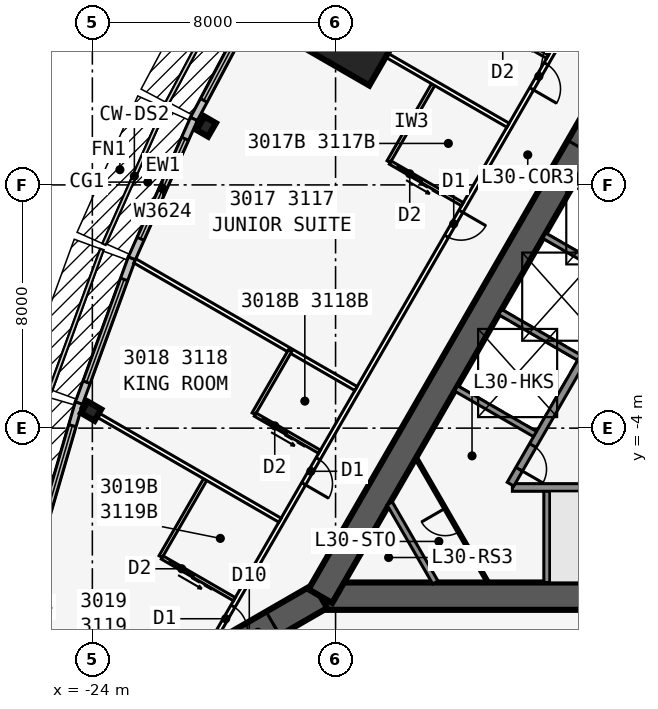
"""IFC4 building model, lengths in metres.
Left out: names, types, materials, properties, quantities, classifications, styles, units other than length and angle.
Written with IfcOpenShell. Run it as: python <this file> out.ifc"""

import sys

from ifc_helpers import new_model, si_unit, direction, frame, frame_2d, origin, origin_2d, place, context, subcontext, project, spatial, rectangle, i_section, extrude, element, fill, save


model = new_model("IFC4")
c1 = context("Model", 3, precision=1e-05, world=origin(), true_north=direction((0.0, 1.0)))
c2 = subcontext(c1, "Body", "Model", "MODEL_VIEW")
j1 = project(units=[si_unit("LENGTHUNIT", "METRE"), si_unit("PLANEANGLEUNIT", "RADIAN")], contexts=[c1])
p1 = place(None, origin())
s1 = spatial("IfcSite", under=j1, at=p1, CompositionType="ELEMENT")
p2 = place(p1, origin())
s2 = spatial("IfcBuilding", under=s1, at=p2, CompositionType="ELEMENT")
p3 = place(p2, frame((0.0, 0.0, 118.1)))
s3 = spatial("IfcBuildingStorey", under=s2, at=p3, CompositionType="ELEMENT", Elevation=118.1)
p4 = place(p3, frame((-16.5, -9.526, 0.0), z_axis=(0.0, 0.0, 1.0), x_axis=(1.0, 0.0, 0.0)))
e1 = element("IfcWall", 1, at=p4, inside=s3, PredefinedType="SHEAR", context=c2, shape_type="SweptSolid", body=[
    extrude(rectangle(XDim=33.0, YDim=0.9, at=frame_2d((16.5, 0.0))), origin(), (0.0, 0.0, 1.0), 3.4),
])
p5 = place(p4, frame((14.05, 0.0, 0.0)))
e2 = element("IfcOpeningElement", 2, at=p5, cuts=e1, PredefinedType="OPENING", context=c2, shape_type="SweptSolid", body=[
    extrude(rectangle(XDim=1.8, YDim=2.13, at=frame_2d((0.9, 1.065))), frame((0.0, 0.46, 0.0), z_axis=(0.0, -1.0, 0.0), x_axis=(1.0, 0.0, 0.0)), (0.0, 0.0, 1.0), 0.92),
])
p6 = place(p3, frame((-10.183, -5.951, 0.0), z_axis=(0.0, 0.0, 1.0), x_axis=(1.0, 0.0, 0.0)))
e3 = element("IfcWall", 3, at=p6, inside=s3, PredefinedType="SOLIDWALL", context=c2, shape_type="SweptSolid", body=[
    extrude(rectangle(XDim=7.633, YDim=0.25, at=frame_2d((3.816, 0.0))), origin(), (0.0, 0.0, 1.0), 3.235),
])
p7 = place(p3, frame((-9.05, -5.951, 0.0), z_axis=(0.0, 0.0, 1.0), x_axis=(0.0, -1.0, 0.0)))
e4 = element("IfcWall", 4, at=p7, inside=s3, PredefinedType="SOLIDWALL", context=c2, shape_type="SweptSolid", body=[
    extrude(rectangle(XDim=3.125, YDim=0.2, at=frame_2d((1.562, 0.0))), origin(), (0.0, 0.0, 1.0), 3.235),
])
p8 = place(p3, frame((0.0, 19.052, 0.0), z_axis=(0.0, 0.0, 1.0), x_axis=(-0.499999749417, -0.866025548458, 0.0)))
e5 = element("IfcWall", 5, at=p8, inside=s3, PredefinedType="SHEAR", context=c2, shape_type="SweptSolid", body=[
    extrude(rectangle(XDim=33.0, YDim=0.9, at=frame_2d((16.5, 0.0))), origin(), (0.0, 0.0, 1.0), 3.4),
])
p9 = place(p8, frame((14.15, 0.0, 0.0)))
e6 = element("IfcOpeningElement", 6, at=p9, cuts=e5, PredefinedType="OPENING", context=c2, shape_type="SweptSolid", body=[
    extrude(rectangle(XDim=1.8, YDim=2.13, at=frame_2d((0.9, 1.065))), frame((0.0, 0.46, 0.0), z_axis=(0.0, -1.0, 0.0), x_axis=(1.0, 0.0, 0.0)), (0.0, 0.0, 1.0), 0.92),
])
p10 = place(p8, frame((12.6, 0.0, 0.0)))
e7 = element("IfcOpeningElement", 7, at=p10, cuts=e5, PredefinedType="OPENING", context=c2, shape_type="SweptSolid", body=[
    extrude(rectangle(XDim=1.0, YDim=2.13, at=frame_2d((0.5, 1.065))), frame((0.0, 0.46, 0.0), z_axis=(0.0, -1.0, 0.0), x_axis=(1.0, 0.0, 0.0)), (0.0, 0.0, 1.0), 0.92),
])
p11 = place(p3, frame((-4.929, 3.365, 0.0), z_axis=(0.0, 0.0, 1.0), x_axis=(-0.499991433582, -0.866030349552, 0.0)))
e8 = element("IfcWall", 8, at=p11, inside=s3, PredefinedType="SOLIDWALL", context=c2, shape_type="SweptSolid", body=[
    extrude(rectangle(XDim=10.633, YDim=0.25, at=frame_2d((5.316, 0.0))), origin(), (0.0, 0.0, 1.0), 3.235),
])
p12 = place(p11, frame((9.164, 0.0, 0.0)))
e9 = element("IfcOpeningElement", 9, at=p12, cuts=e8, PredefinedType="OPENING", context=c2, shape_type="SweptSolid", body=[
    extrude(rectangle(XDim=0.9, YDim=2.13, at=frame_2d((0.45, 1.065))), frame((0.0, 0.135, 0.0), z_axis=(0.0, -1.0, 0.0), x_axis=(1.0, 0.0, 0.0)), (0.0, 0.0, 1.0), 0.27),
])
for number, where, z_axis, x_axis in (
    (10, (-6.429, 0.767, 0.0), (0.0, 0.0, 1.0), (-0.866, 0.5, 0.0)),
    (11, (-7.879, -1.744, 0.0), (0.0, 0.0, 1.0), (-0.866, 0.5, 0.0)),
    (12, (-9.329, -4.256, 0.0), (0.0, 0.0, 1.0), (-0.866, 0.5, 0.0)),
):
    element("IfcWall", number, at=place(p3, frame(where, z_axis=z_axis, x_axis=x_axis)), inside=s3, PredefinedType="SOLIDWALL", context=c2, shape_type="SweptSolid", body=[
        extrude(rectangle(XDim=3.125, YDim=0.2, at=frame_2d((1.562, 0.0))), origin(), (0.0, 0.0, 1.0), 3.235),
    ])
p13 = place(p3, frame((-16.5, -9.526, 0.0), z_axis=(0.0, 0.0, 1.0), x_axis=(-0.866031398331, -0.499989616998, 0.0)))
e13 = element("IfcWall", 13, at=p13, inside=s3, PredefinedType="SHEAR", context=c2, shape_type="SweptSolid", body=[
    extrude(rectangle(XDim=4.746, YDim=0.9, at=frame_2d((2.373, 0.0))), origin(), (0.0, 0.0, 1.0), 3.4),
])
p14 = place(p13, frame((1.8, 0.0, 0.0)))
e14 = element("IfcOpeningElement", 14, at=p14, cuts=e13, PredefinedType="OPENING", context=c2, shape_type="SweptSolid", body=[
    extrude(rectangle(XDim=1.8, YDim=2.13, at=frame_2d((0.9, 1.065))), frame((0.0, 0.46, 0.0), z_axis=(0.0, -1.0, 0.0), x_axis=(1.0, 0.0, 0.0)), (0.0, 0.0, 1.0), 0.92),
])
for number, where, z_axis, x_axis in (
    (15, (-20.254, 5.92, 0.0), (0.0, 0.0, 1.0), (-0.866, 0.5, 0.0)),
    (16, (-24.041, -3.44, 0.0), (0.0, 0.0, 1.0), (-0.5, -0.866, 0.0)),
):
    element("IfcColumn", number, at=place(p3, frame(where, z_axis=z_axis, x_axis=x_axis)), inside=s3, PredefinedType="COLUMN", context=c2, shape_type="SweptSolid", body=[
        extrude(i_section(OverallWidth=0.437, OverallDepth=0.513, WebThickness=0.061, FlangeThickness=0.097, at=origin_2d()), origin(), (0.0, 0.0, 1.0), 3.4),
    ])
p15 = place(p3, frame((-15.312, 8.84, 0.0), z_axis=(0.0, 0.0, 1.0), x_axis=(-0.866025403784, 0.5, 0.0)))
e17 = element("IfcColumn", 17, at=p15, inside=s3, PredefinedType="COLUMN", context=c2, shape_type="SweptSolid", body=[
    extrude(rectangle(XDim=2.3, YDim=2.3, at=origin_2d()), origin(), (0.0, 0.0, 1.0), 3.4),
])
p16 = place(p3, frame((-18.314, 10.579, 0.0), z_axis=(0.0, 0.0, 1.0), x_axis=(-0.469404966864, -0.882982999317, 0.0)))
e18 = element("IfcWall", 18, at=p16, inside=s3, PredefinedType="STANDARD", context=c2, shape_type="SweptSolid", body=[
    extrude(rectangle(XDim=5.003, YDim=0.25, at=frame_2d((2.501, 0.0))), origin(), (0.0, 0.0, 1.0), 3.235),
])
p17 = place(p16, frame((0.701, 0.0, 0.45)))
e19 = element("IfcOpeningElement", 19, at=p17, cuts=e18, PredefinedType="OPENING", context=c2, shape_type="SweptSolid", body=[
    extrude(rectangle(XDim=3.6, YDim=2.4, at=frame_2d((1.8, 1.2))), frame((0.0, 0.135, 0.0), z_axis=(0.0, -1.0, 0.0), x_axis=(1.0, 0.0, 0.0)), (0.0, 0.0, 1.0), 0.27),
])
p18 = place(p3, frame((-20.659, 6.169, 0.0), z_axis=(0.0, 0.0, 1.0), x_axis=(-0.406832200364, -0.913502906808, 0.0)))
e20 = element("IfcWall", 20, at=p18, inside=s3, PredefinedType="STANDARD", context=c2, shape_type="SweptSolid", body=[
    extrude(rectangle(XDim=5.028, YDim=0.25, at=frame_2d((2.514, 0.0))), origin(), (0.0, 0.0, 1.0), 3.235),
])
p19 = place(p18, frame((0.714, 0.0, 0.45)))
e21 = element("IfcOpeningElement", 21, at=p19, cuts=e20, PredefinedType="OPENING", context=c2, shape_type="SweptSolid", body=[
    extrude(rectangle(XDim=3.6, YDim=2.4, at=frame_2d((1.8, 1.2))), frame((0.0, 0.135, 0.0), z_axis=(0.0, -1.0, 0.0), x_axis=(1.0, 0.0, 0.0)), (0.0, 0.0, 1.0), 0.27),
])
p20 = place(p3, frame((-22.701, 1.584, 0.0), z_axis=(0.0, 0.0, 1.0), x_axis=(-0.343225593282, -0.939252996863, 0.0)))
e22 = element("IfcWall", 22, at=p20, inside=s3, PredefinedType="STANDARD", context=c2, shape_type="SweptSolid", body=[
    extrude(rectangle(XDim=5.076, YDim=0.25, at=frame_2d((2.538, 0.0))), origin(), (0.0, 0.0, 1.0), 3.235),
])
p21 = place(p20, frame((0.738, 0.0, 0.45)))
e23 = element("IfcOpeningElement", 23, at=p21, cuts=e22, PredefinedType="OPENING", context=c2, shape_type="SweptSolid", body=[
    extrude(rectangle(XDim=3.6, YDim=2.4, at=frame_2d((1.8, 1.2))), frame((0.0, 0.135, 0.0), z_axis=(0.0, -1.0, 0.0), x_axis=(1.0, 0.0, 0.0)), (0.0, 0.0, 1.0), 0.27),
])
p22 = place(p3, frame((-24.441, -3.175, 0.0), z_axis=(0.0, 0.0, 1.0), x_axis=(-0.279528287117, -0.960137457191, 0.0)))
e24 = element("IfcWall", 24, at=p22, inside=s3, PredefinedType="STANDARD", context=c2, shape_type="SweptSolid", body=[
    extrude(rectangle(XDim=5.148, YDim=0.25, at=frame_2d((2.574, 0.0))), origin(), (0.0, 0.0, 1.0), 3.235),
])
p23 = place(p22, frame((0.774, 0.0, 0.45)))
e25 = element("IfcOpeningElement", 25, at=p23, cuts=e24, PredefinedType="OPENING", context=c2, shape_type="SweptSolid", body=[
    extrude(rectangle(XDim=3.6, YDim=2.4, at=frame_2d((1.8, 1.2))), frame((0.0, 0.135, 0.0), z_axis=(0.0, -1.0, 0.0), x_axis=(1.0, 0.0, 0.0)), (0.0, 0.0, 1.0), 0.27),
])
p24 = place(p3, frame((-0.5, 22.836, 0.0), z_axis=(0.0, 0.0, 1.0), x_axis=(-0.500001677587, -0.866024435227, 0.0)))
e26 = element("IfcWall", 26, at=p24, inside=s3, PredefinedType="PARTITIONING", context=c2, shape_type="SweptSolid", body=[
    extrude(rectangle(XDim=39.054, YDim=0.15, at=frame_2d((19.527, 0.0))), origin(), (0.0, 0.0, 1.0), 3.235),
])
p25 = place(p24, frame((0.352, 0.0, 0.0)))
e27 = element("IfcOpeningElement", 27, at=p25, cuts=e26, PredefinedType="OPENING", context=c2, shape_type="SweptSolid", body=[
    extrude(rectangle(XDim=0.95, YDim=2.13, at=frame_2d((0.475, 1.065))), frame((0.0, 0.085, 0.0), z_axis=(0.0, -1.0, 0.0), x_axis=(1.0, 0.0, 0.0)), (0.0, 0.0, 1.0), 0.17),
])
p26 = place(p24, frame((7.152, 0.0, 0.0)))
e28 = element("IfcOpeningElement", 28, at=p26, cuts=e26, PredefinedType="OPENING", context=c2, shape_type="SweptSolid", body=[
    extrude(rectangle(XDim=0.95, YDim=2.13, at=frame_2d((0.475, 1.065))), frame((0.0, 0.085, 0.0), z_axis=(0.0, -1.0, 0.0), x_axis=(1.0, 0.0, 0.0)), (0.0, 0.0, 1.0), 0.17),
])
p27 = place(p24, frame((12.152, 0.0, 0.0)))
e29 = element("IfcOpeningElement", 29, at=p27, cuts=e26, PredefinedType="OPENING", context=c2, shape_type="SweptSolid", body=[
    extrude(rectangle(XDim=0.95, YDim=2.13, at=frame_2d((0.475, 1.065))), frame((0.0, 0.085, 0.0), z_axis=(0.0, -1.0, 0.0), x_axis=(1.0, 0.0, 0.0)), (0.0, 0.0, 1.0), 0.17),
])
p28 = place(p24, frame((17.152, 0.0, 0.0)))
e30 = element("IfcOpeningElement", 30, at=p28, cuts=e26, PredefinedType="OPENING", context=c2, shape_type="SweptSolid", body=[
    extrude(rectangle(XDim=0.95, YDim=2.13, at=frame_2d((0.475, 1.065))), frame((0.0, 0.085, 0.0), z_axis=(0.0, -1.0, 0.0), x_axis=(1.0, 0.0, 0.0)), (0.0, 0.0, 1.0), 0.17),
])
p29 = place(p24, frame((22.752, 0.0, 0.0)))
e31 = element("IfcOpeningElement", 31, at=p29, cuts=e26, PredefinedType="OPENING", context=c2, shape_type="SweptSolid", body=[
    extrude(rectangle(XDim=0.95, YDim=2.13, at=frame_2d((0.475, 1.065))), frame((0.0, 0.085, 0.0), z_axis=(0.0, -1.0, 0.0), x_axis=(1.0, 0.0, 0.0)), (0.0, 0.0, 1.0), 0.17),
])
p30 = place(p24, frame((32.152, 0.0, 0.0)))
e32 = element("IfcOpeningElement", 32, at=p30, cuts=e26, PredefinedType="OPENING", context=c2, shape_type="SweptSolid", body=[
    extrude(rectangle(XDim=0.95, YDim=2.13, at=frame_2d((0.475, 1.065))), frame((0.0, 0.085, 0.0), z_axis=(0.0, -1.0, 0.0), x_axis=(1.0, 0.0, 0.0)), (0.0, 0.0, 1.0), 0.17),
])
p31 = place(p24, frame((37.752, 0.0, 0.0)))
e33 = element("IfcOpeningElement", 33, at=p31, cuts=e26, PredefinedType="OPENING", context=c2, shape_type="SweptSolid", body=[
    extrude(rectangle(XDim=0.95, YDim=2.13, at=frame_2d((0.475, 1.065))), frame((0.0, 0.085, 0.0), z_axis=(0.0, -1.0, 0.0), x_axis=(1.0, 0.0, 0.0)), (0.0, 0.0, 1.0), 0.17),
])
p32 = place(p3, frame((-10.329, 5.963, 0.0), z_axis=(0.0, 0.0, 1.0), x_axis=(-0.866025170687, 0.500000403736, 0.0)))
e34 = element("IfcWall", 34, at=p32, inside=s3, PredefinedType="PARTITIONING", context=c2, shape_type="SweptSolid", body=[
    extrude(rectangle(XDim=9.099, YDim=0.15, at=frame_2d((4.549, 0.0))), origin(), (0.0, 0.0, 1.0), 2.389),
])
p33 = place(p3, frame((-15.329, -2.697, 0.0), z_axis=(0.0, 0.0, 1.0), x_axis=(-0.866024316602, 0.50000188305, 0.0)))
e35 = element("IfcWall", 35, at=p33, inside=s3, PredefinedType="PARTITIONING", context=c2, shape_type="SweptSolid", body=[
    extrude(rectangle(XDim=8.395, YDim=0.15, at=frame_2d((4.198, 0.0))), origin(), (0.0, 0.0, 1.0), 2.389),
])
p34 = place(p3, frame((-17.829, -7.027, 0.0), z_axis=(0.0, 0.0, 1.0), x_axis=(-0.866029804378, 0.499992377871, 0.0)))
e36 = element("IfcWall", 36, at=p34, inside=s3, PredefinedType="PARTITIONING", context=c2, shape_type="SweptSolid", body=[
    extrude(rectangle(XDim=7.516, YDim=0.15, at=frame_2d((3.758, 0.0))), origin(), (0.0, 0.0, 1.0), 2.389),
])
p35 = place(p3, frame((-9.029, 8.215, 0.0), z_axis=(0.0, 0.0, 1.0), x_axis=(-0.866023955769, 0.500002508028, 0.0)))
e37 = element("IfcWall", 37, at=p35, inside=s3, PredefinedType="PLUMBINGWALL", context=c2, shape_type="SweptSolid", body=[
    extrude(rectangle(XDim=2.44, YDim=0.12, at=frame_2d((1.22, 0.0))), origin(), (0.0, 0.0, 1.0), 3.235),
])
p36 = place(p35, frame((1.25, 0.0, 0.0)))
e38 = element("IfcOpeningElement", 38, at=p36, cuts=e37, PredefinedType="OPENING", context=c2, shape_type="SweptSolid", body=[
    extrude(rectangle(XDim=0.9, YDim=2.13, at=frame_2d((0.45, 1.065))), frame((0.0, 0.07, 0.0), z_axis=(0.0, -1.0, 0.0), x_axis=(1.0, 0.0, 0.0)), (0.0, 0.0, 1.0), 0.14),
])
p37 = place(p3, frame((-12.753, 7.363, 0.0), z_axis=(0.0, 0.0, 1.0), x_axis=(-0.50002537861, -0.866010750942, 0.0)))
e39 = element("IfcWall", 39, at=p37, inside=s3, PredefinedType="PLUMBINGWALL", context=c2, shape_type="SweptSolid", body=[
    extrude(rectangle(XDim=3.0, YDim=0.12, at=frame_2d((1.5, 0.0))), origin(), (0.0, 0.0, 1.0), 3.235),
])
p38 = place(p3, frame((-11.829, 3.365, 0.0), z_axis=(0.0, 0.0, 1.0), x_axis=(-0.865997131366, 0.500048966069, 0.0)))
e40 = element("IfcWall", 40, at=p38, inside=s3, PredefinedType="PLUMBINGWALL", context=c2, shape_type="SweptSolid", body=[
    extrude(rectangle(XDim=2.74, YDim=0.12, at=frame_2d((1.37, 0.0))), origin(), (0.0, 0.0, 1.0), 3.235),
])
p39 = place(p38, frame((1.55, 0.0, 0.0)))
e41 = element("IfcOpeningElement", 41, at=p39, cuts=e40, PredefinedType="OPENING", context=c2, shape_type="SweptSolid", body=[
    extrude(rectangle(XDim=0.9, YDim=2.13, at=frame_2d((0.45, 1.065))), frame((0.0, 0.07, 0.0), z_axis=(0.0, -1.0, 0.0), x_axis=(1.0, 0.0, 0.0)), (0.0, 0.0, 1.0), 0.14),
])
p40 = place(p3, frame((-17.493, -1.447, 0.0), z_axis=(0.0, 0.0, 1.0), x_axis=(-0.500033551112, -0.866006032174, 0.0)))
e42 = element("IfcWall", 42, at=p40, inside=s3, PredefinedType="PLUMBINGWALL", context=c2, shape_type="SweptSolid", body=[
    extrude(rectangle(XDim=2.4, YDim=0.12, at=frame_2d((1.2, 0.0))), origin(), (0.0, 0.0, 1.0), 3.235),
])
p41 = place(p3, frame((-16.529, -4.776, 0.0), z_axis=(0.0, 0.0, 1.0), x_axis=(-0.866023955769, 0.500002508028, 0.0)))
e43 = element("IfcWall", 43, at=p41, inside=s3, PredefinedType="PLUMBINGWALL", context=c2, shape_type="SweptSolid", body=[
    extrude(rectangle(XDim=2.44, YDim=0.12, at=frame_2d((1.22, 0.0))), origin(), (0.0, 0.0, 1.0), 3.235),
])
p42 = place(p41, frame((1.25, 0.0, 0.0)))
e44 = element("IfcOpeningElement", 44, at=p42, cuts=e43, PredefinedType="OPENING", context=c2, shape_type="SweptSolid", body=[
    extrude(rectangle(XDim=0.9, YDim=2.13, at=frame_2d((0.45, 1.065))), frame((0.0, 0.07, 0.0), z_axis=(0.0, -1.0, 0.0), x_axis=(1.0, 0.0, 0.0)), (0.0, 0.0, 1.0), 0.14),
])
p43 = place(p3, frame((-20.253, -5.627, 0.0), z_axis=(0.0, 0.0, 1.0), x_axis=(-0.499990139034, -0.866031096941, 0.0)))
e45 = element("IfcWall", 45, at=p43, inside=s3, PredefinedType="PLUMBINGWALL", context=c2, shape_type="SweptSolid", body=[
    extrude(rectangle(XDim=3.0, YDim=0.12, at=frame_2d((1.5, 0.0))), origin(), (0.0, 0.0, 1.0), 3.235),
])
p44 = place(p3, frame((-19.329, -9.625, 0.0), z_axis=(0.0, 0.0, 1.0), x_axis=(-0.866035715982, 0.499982138324, 0.0)))
e46 = element("IfcWall", 46, at=p44, inside=s3, PredefinedType="PLUMBINGWALL", context=c2, shape_type="SweptSolid", body=[
    extrude(rectangle(XDim=2.74, YDim=0.12, at=frame_2d((1.37, 0.0))), origin(), (0.0, 0.0, 1.0), 3.235),
])
p45 = place(p44, frame((1.55, 0.0, 0.0)))
e47 = element("IfcOpeningElement", 47, at=p45, cuts=e46, PredefinedType="OPENING", context=c2, shape_type="SweptSolid", body=[
    extrude(rectangle(XDim=0.9, YDim=2.13, at=frame_2d((0.45, 1.065))), frame((0.0, 0.07, 0.0), z_axis=(0.0, -1.0, 0.0), x_axis=(1.0, 0.0, 0.0)), (0.0, 0.0, 1.0), 0.14),
])
p46 = place(p3, frame((-12.719, -9.076, 0.0), z_axis=(0.0, 0.0, 1.0), x_axis=(-0.499952404951, 0.866052881055, 0.0)))
e48 = element("IfcWall", 48, at=p46, inside=s3, PredefinedType="SOLIDWALL", context=c2, shape_type="SweptSolid", body=[
    extrude(rectangle(XDim=3.002, YDim=0.2, at=frame_2d((1.501, 0.0))), origin(), (0.0, 0.0, 1.0), 3.235),
])
p47 = place(p3, frame((-10.986, -9.076, 0.0), z_axis=(0.0, 0.0, 1.0), x_axis=(-0.499999210213, 0.866025859768, 0.0)))
e49 = element("IfcWall", 49, at=p47, inside=s3, PredefinedType="PARTITIONING", context=c2, shape_type="SweptSolid", body=[
    extrude(rectangle(XDim=4.734, YDim=0.1, at=frame_2d((2.367, 0.0))), origin(), (0.0, 0.0, 1.0), 3.235),
])
p48 = place(p47, frame((1.917, 0.0, 0.0)))
e50 = element("IfcOpeningElement", 50, at=p48, cuts=e49, PredefinedType="OPENING", context=c2, shape_type="SweptSolid", body=[
    extrude(rectangle(XDim=0.9, YDim=2.13, at=frame_2d((0.45, 1.065))), frame((0.0, 0.06, 0.0), z_axis=(0.0, -1.0, 0.0), x_axis=(1.0, 0.0, 0.0)), (0.0, 0.0, 1.0), 0.12),
])
p49 = place(p17, origin())
e51 = element("IfcWindow", 51, at=p49, inside=s3, PartitioningType="SINGLE_PANEL", PredefinedType="WINDOW", context=c2, shape_type="SweptSolid", body=[
    extrude(rectangle(XDim=3.6, YDim=2.4, at=frame_2d((1.8, 1.2))), frame((0.0, 0.03, 0.0), z_axis=(0.0, -1.0, 0.0), x_axis=(1.0, 0.0, 0.0)), (0.0, 0.0, 1.0), 0.06),
])
fill(e19, e51)
p50 = place(p19, origin())
e52 = element("IfcWindow", 52, at=p50, inside=s3, PartitioningType="SINGLE_PANEL", PredefinedType="WINDOW", context=c2, shape_type="SweptSolid", body=[
    extrude(rectangle(XDim=3.6, YDim=2.4, at=frame_2d((1.8, 1.2))), frame((0.0, 0.03, 0.0), z_axis=(0.0, -1.0, 0.0), x_axis=(1.0, 0.0, 0.0)), (0.0, 0.0, 1.0), 0.06),
])
fill(e21, e52)
p51 = place(p21, origin())
e53 = element("IfcWindow", 53, at=p51, inside=s3, PartitioningType="SINGLE_PANEL", PredefinedType="WINDOW", context=c2, shape_type="SweptSolid", body=[
    extrude(rectangle(XDim=3.6, YDim=2.4, at=frame_2d((1.8, 1.2))), frame((0.0, 0.03, 0.0), z_axis=(0.0, -1.0, 0.0), x_axis=(1.0, 0.0, 0.0)), (0.0, 0.0, 1.0), 0.06),
])
fill(e23, e53)
p52 = place(p23, origin())
e54 = element("IfcWindow", 54, at=p52, inside=s3, PartitioningType="SINGLE_PANEL", PredefinedType="WINDOW", context=c2, shape_type="SweptSolid", body=[
    extrude(rectangle(XDim=3.6, YDim=2.4, at=frame_2d((1.8, 1.2))), frame((0.0, 0.03, 0.0), z_axis=(0.0, -1.0, 0.0), x_axis=(1.0, 0.0, 0.0)), (0.0, 0.0, 1.0), 0.06),
])
fill(e25, e54)
p53 = place(p28, origin())
e55 = element("IfcDoor", 55, at=p53, inside=s3, OperationType="SINGLE_SWING_RIGHT", PredefinedType="DOOR", context=c2, shape_type="SweptSolid", body=[
    extrude(rectangle(XDim=0.95, YDim=2.13, at=frame_2d((0.475, 1.065))), frame((0.0, 0.025, 0.0), z_axis=(0.0, -1.0, 0.0), x_axis=(1.0, 0.0, 0.0)), (0.0, 0.0, 1.0), 0.05),
])
fill(e30, e55)
p54 = place(p39, origin())
e56 = element("IfcDoor", 56, at=p54, inside=s3, OperationType="SLIDING_TO_LEFT", PredefinedType="DOOR", context=c2, shape_type="SweptSolid", body=[
    extrude(rectangle(XDim=0.9, YDim=2.13, at=frame_2d((0.45, 1.065))), frame((0.0, 0.025, 0.0), z_axis=(0.0, -1.0, 0.0), x_axis=(1.0, 0.0, 0.0)), (0.0, 0.0, 1.0), 0.05),
])
fill(e41, e56)
p55 = place(p29, origin())
e57 = element("IfcDoor", 57, at=p55, inside=s3, OperationType="SINGLE_SWING_LEFT", PredefinedType="DOOR", context=c2, shape_type="SweptSolid", body=[
    extrude(rectangle(XDim=0.95, YDim=2.13, at=frame_2d((0.475, 1.065))), frame((0.0, 0.025, 0.0), z_axis=(0.0, -1.0, 0.0), x_axis=(1.0, 0.0, 0.0)), (0.0, 0.0, 1.0), 0.05),
])
fill(e31, e57)
p56 = place(p42, origin())
e58 = element("IfcDoor", 58, at=p56, inside=s3, OperationType="SLIDING_TO_LEFT", PredefinedType="DOOR", context=c2, shape_type="SweptSolid", body=[
    extrude(rectangle(XDim=0.9, YDim=2.13, at=frame_2d((0.45, 1.065))), frame((0.0, 0.025, 0.0), z_axis=(0.0, -1.0, 0.0), x_axis=(1.0, 0.0, 0.0)), (0.0, 0.0, 1.0), 0.05),
])
fill(e44, e58)
p57 = place(p30, origin())
e59 = element("IfcDoor", 59, at=p57, inside=s3, OperationType="SINGLE_SWING_RIGHT", PredefinedType="DOOR", context=c2, shape_type="SweptSolid", body=[
    extrude(rectangle(XDim=0.95, YDim=2.13, at=frame_2d((0.475, 1.065))), frame((0.0, 0.025, 0.0), z_axis=(0.0, -1.0, 0.0), x_axis=(1.0, 0.0, 0.0)), (0.0, 0.0, 1.0), 0.05),
])
fill(e32, e59)
p58 = place(p45, origin())
e60 = element("IfcDoor", 60, at=p58, inside=s3, OperationType="SLIDING_TO_LEFT", PredefinedType="DOOR", context=c2, shape_type="SweptSolid", body=[
    extrude(rectangle(XDim=0.9, YDim=2.13, at=frame_2d((0.45, 1.065))), frame((0.0, 0.025, 0.0), z_axis=(0.0, -1.0, 0.0), x_axis=(1.0, 0.0, 0.0)), (0.0, 0.0, 1.0), 0.05),
])
fill(e47, e60)
p59 = place(p31, origin())
e61 = element("IfcDoor", 61, at=p59, inside=s3, OperationType="SINGLE_SWING_RIGHT", PredefinedType="DOOR", context=c2, shape_type="SweptSolid", body=[
    extrude(rectangle(XDim=0.95, YDim=2.13, at=frame_2d((0.475, 1.065))), frame((0.0, 0.025, 0.0), z_axis=(0.0, -1.0, 0.0), x_axis=(1.0, 0.0, 0.0)), (0.0, 0.0, 1.0), 0.05),
])
fill(e33, e61)
p60 = place(p14, origin())
e62 = element("IfcDoor", 62, at=p60, inside=s3, OperationType="DOUBLE_DOOR_DOUBLE_SWING", PredefinedType="DOOR", context=c2, shape_type="SweptSolid", body=[
    extrude(rectangle(XDim=1.8, YDim=2.13, at=frame_2d((0.9, 1.065))), frame((0.0, 0.025, 0.0), z_axis=(0.0, -1.0, 0.0), x_axis=(1.0, 0.0, 0.0)), (0.0, 0.0, 1.0), 0.05),
])
fill(e14, e62)
p61 = place(p48, origin())
e63 = element("IfcDoor", 63, at=p61, inside=s3, OperationType="SINGLE_SWING_RIGHT", PredefinedType="DOOR", context=c2, shape_type="SweptSolid", body=[
    extrude(rectangle(XDim=0.9, YDim=2.13, at=frame_2d((0.45, 1.065))), frame((0.0, 0.025, 0.0), z_axis=(0.0, -1.0, 0.0), x_axis=(1.0, 0.0, 0.0)), (0.0, 0.0, 1.0), 0.05),
])
fill(e50, e63)
p62 = place(p12, origin())
e64 = element("IfcDoor", 64, at=p62, inside=s3, OperationType="SINGLE_SWING_RIGHT", PredefinedType="DOOR", context=c2, shape_type="SweptSolid", body=[
    extrude(rectangle(XDim=0.9, YDim=2.13, at=frame_2d((0.45, 1.065))), frame((0.0, 0.025, 0.0), z_axis=(0.0, -1.0, 0.0), x_axis=(1.0, 0.0, 0.0)), (0.0, 0.0, 1.0), 0.05),
])
fill(e9, e64)
save(model, sys.argv[1])
